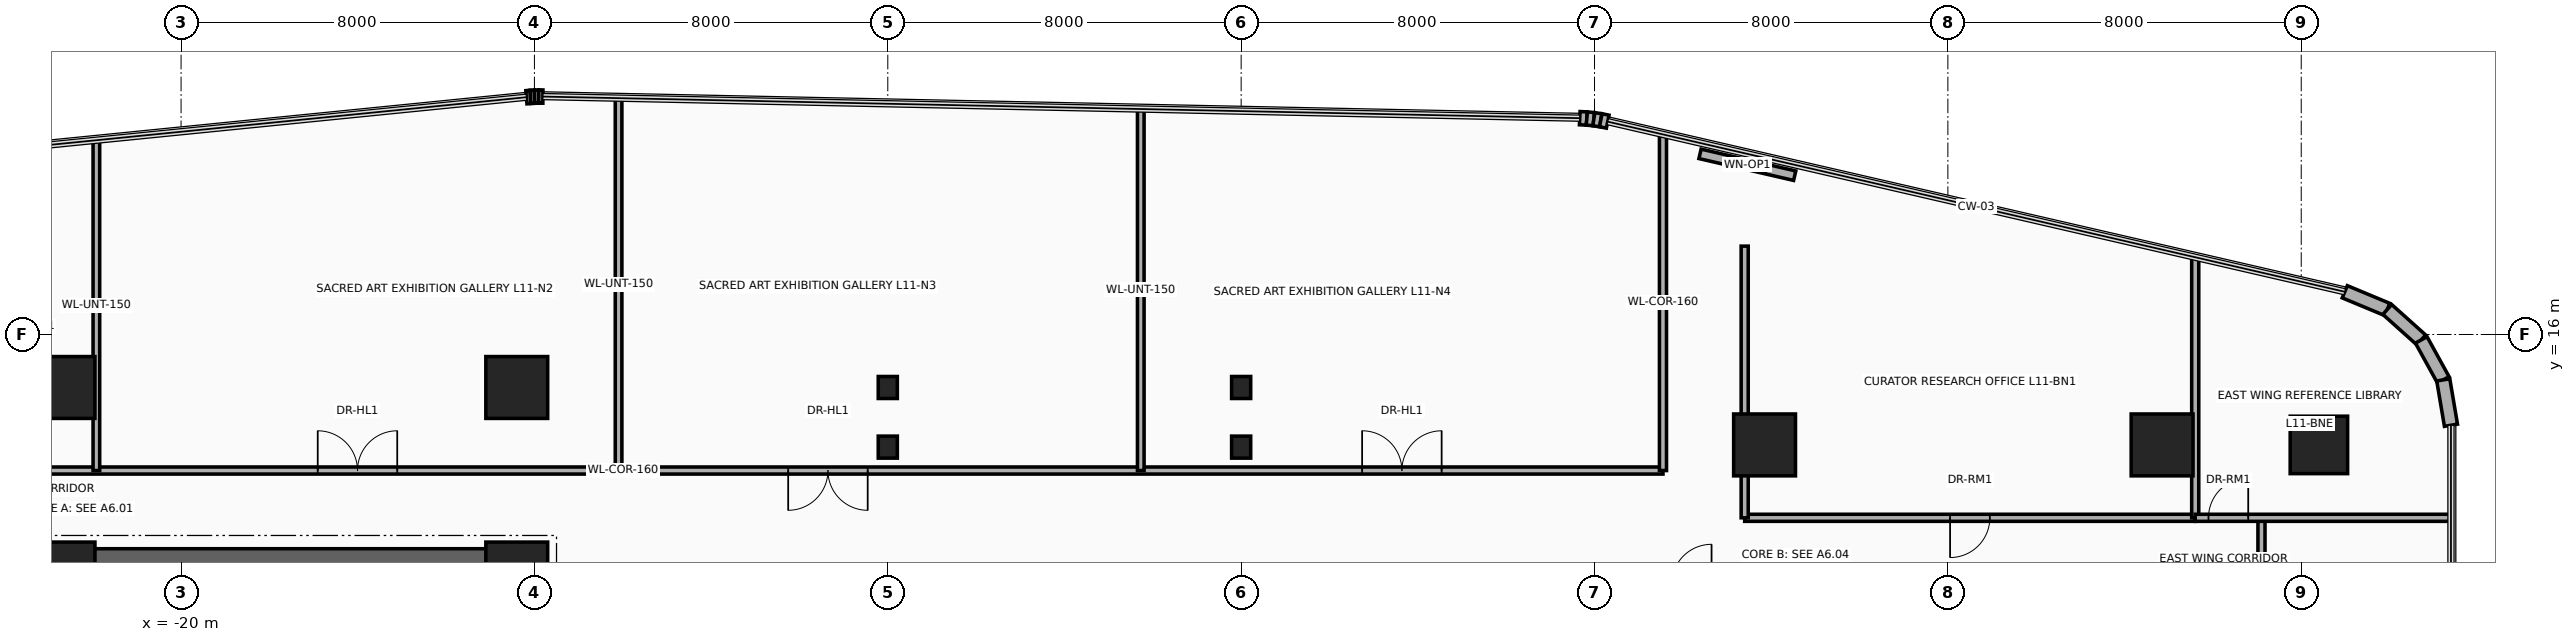
"""IFC4 building model, lengths in metres.
Left out: names, types, materials, properties, quantities, classifications, styles, units other than length and angle.
Written with IfcOpenShell. Run it as: python <this file> out.ifc"""

import sys

from ifc_helpers import new_model, si_unit, direction, frame, frame_2d, origin, origin_2d, place, context, subcontext, project, spatial, rectangle, circle, i_section, extrude, source, transform, mapped, element, fill, save


model = new_model("IFC4")
c1 = context("Model", 3, precision=1e-05, world=origin(), true_north=direction((0.0, 1.0)))
c2 = subcontext(c1, "Body", "Model", "MODEL_VIEW")
j1 = project(units=[si_unit("LENGTHUNIT", "METRE"), si_unit("PLANEANGLEUNIT", "RADIAN")], contexts=[c1])
p1 = place(None, origin())
s1 = spatial("IfcSite", under=j1, at=p1, CompositionType="ELEMENT")
p2 = place(p1, origin())
s2 = spatial("IfcBuilding", under=s1, at=p2, CompositionType="ELEMENT")
p3 = place(p2, frame((0.0, 0.0, 48.2)))
s3 = spatial("IfcBuildingStorey", under=s2, at=p3, CompositionType="ELEMENT", Elevation=48.2)
p4 = place(p3, frame((-22.65, -11.15, 0.0), z_axis=(0.0, 0.0, 1.0), x_axis=(0.0, 1.0, 0.0)))
e1 = element("IfcWall", 1, at=p4, inside=s3, PredefinedType="SHEAR", context=c2, shape_type="SweptSolid", body=[
    extrude(rectangle(XDim=22.3, YDim=0.7, at=frame_2d((11.15, 0.0))), origin(), (0.0, 0.0, 1.0), 3.46),
])
p5 = place(p3, frame((-22.65, 10.8, 0.0), z_axis=(0.0, 0.0, 1.0), x_axis=(1.0, 0.0, 0.0)))
e2 = element("IfcWall", 2, at=p5, inside=s3, PredefinedType="SHEAR", context=c2, shape_type="SweptSolid", body=[
    extrude(rectangle(XDim=10.25, YDim=0.7, at=frame_2d((5.125, 0.0))), origin(), (0.0, 0.0, 1.0), 3.46),
])
m1 = source(origin(), c2, "Body", "SweptSolid", [
    extrude(rectangle(XDim=1.4, YDim=1.4, at=origin_2d()), origin(), (0.0, 0.0, 1.0), 3.7),
])
for number, where, z_axis, x_axis in (
    (3, (-22.65, 10.6, 0.0), (0.0, 0.0, 1.0), (1.0, 0.0, 0.0)),
    (4, (-12.4, 10.6, 0.0), (0.0, 0.0, 1.0), (1.0, 0.0, 0.0)),
    (5, (-22.65, 14.8, 0.0), (0.0, 0.0, 1.0), (1.0, 0.0, 0.0)),
    (6, (-12.4, 14.8, 0.0), (0.0, 0.0, 1.0), (1.0, 0.0, 0.0)),
    (7, (15.85, 13.5, 0.0), (0.0, 0.0, 1.0), (1.0, 0.0, 0.0)),
    (8, (24.85, 13.5, 0.0), (0.0, 0.0, 1.0), (1.0, 0.0, 0.0)),
):
    element("IfcColumn", number, at=place(p3, frame(where, z_axis=z_axis, x_axis=x_axis)), inside=s3, PredefinedType="COLUMN", context=c2, shape_type="MappedRepresentation", body=[
        mapped(m1, transform((0.0, 0.0, 0.0), x_axis=(1.0, 0.0, 0.0), y_axis=(0.0, 1.0, 0.0), z_axis=(0.0, 0.0, 1.0), scale=1.0)),
    ])
m2 = source(origin(), c2, "Body", "SweptSolid", [
    extrude(circle(Radius=0.65, at=origin_2d()), origin(), (0.0, 0.0, 1.0), 3.7),
])
p6 = place(p3, frame((28.4, 13.5, 0.0), z_axis=(0.0, 0.0, 1.0), x_axis=(1.0, 0.0, 0.0)))
e9 = element("IfcColumn", 9, at=p6, inside=s3, PredefinedType="COLUMN", context=c2, shape_type="MappedRepresentation", body=[
    mapped(m2, transform((0.0, 0.0, 0.0), x_axis=(1.0, 0.0, 0.0), y_axis=(0.0, 1.0, 0.0), z_axis=(0.0, 0.0, 1.0), scale=1.0)),
])
m3 = source(origin(), c2, "Body", "SweptSolid", [
    extrude(i_section(OverallWidth=0.432, OverallDepth=0.498, WebThickness=0.056, FlangeThickness=0.089, at=origin_2d()), origin(), (0.0, 0.0, 1.0), 3.7),
])
for number, where, z_axis, x_axis in (
    (10, (-4.0, 13.45, 0.0), (0.0, 0.0, 1.0), (1.0, 0.0, 0.0)),
    (11, (-4.0, 14.8, 0.0), (0.0, 0.0, 1.0), (1.0, 0.0, 0.0)),
    (12, (4.0, 13.45, 0.0), (0.0, 0.0, 1.0), (1.0, 0.0, 0.0)),
    (13, (4.0, 14.8, 0.0), (0.0, 0.0, 1.0), (1.0, 0.0, 0.0)),
):
    element("IfcColumn", number, at=place(p3, frame(where, z_axis=z_axis, x_axis=x_axis)), inside=s3, PredefinedType="COLUMN", context=c2, shape_type="MappedRepresentation", body=[
        mapped(m3, transform((0.0, 0.0, 0.0), x_axis=(1.0, 0.0, 0.0), y_axis=(0.0, 1.0, 0.0), z_axis=(0.0, 0.0, 1.0), scale=1.0)),
    ])
p7 = place(p3, frame((-12.182, 21.371, 0.0), z_axis=(0.0, 0.0, 1.0), x_axis=(0.996527790842, 0.08326080759, 0.0)))
e14 = element("IfcWall", 14, at=p7, inside=s3, PredefinedType="SOLIDWALL", context=c2, shape_type="SweptSolid", body=[
    extrude(rectangle(XDim=0.094, YDim=0.3, at=frame_2d((0.047, 0.0))), origin(), (0.0, 0.0, 1.0), 3.46),
])
p8 = place(p3, frame((-12.088, 21.379, 0.0), z_axis=(0.0, 0.0, 1.0), x_axis=(0.998476480444, 0.055178963393, 0.0)))
e15 = element("IfcWall", 15, at=p8, inside=s3, PredefinedType="SOLIDWALL", context=c2, shape_type="SweptSolid", body=[
    extrude(rectangle(XDim=0.093, YDim=0.3, at=frame_2d((0.046, 0.0))), origin(), (0.0, 0.0, 1.0), 3.46),
])
p9 = place(p3, frame((-11.996, 21.384, 0.0), z_axis=(0.0, 0.0, 1.0), x_axis=(0.999722573757, 0.023553673204, 0.0)))
e16 = element("IfcWall", 16, at=p9, inside=s3, PredefinedType="SOLIDWALL", context=c2, shape_type="SweptSolid", body=[
    extrude(rectangle(XDim=0.093, YDim=0.3, at=frame_2d((0.047, 0.0))), origin(), (0.0, 0.0, 1.0), 3.46),
])
p10 = place(p3, frame((-11.902, 21.386, 0.0), z_axis=(0.0, 0.0, 1.0), x_axis=(0.999986507273, -0.005194735103, 0.0)))
e17 = element("IfcWall", 17, at=p10, inside=s3, PredefinedType="SOLIDWALL", context=c2, shape_type="SweptSolid", body=[
    extrude(rectangle(XDim=0.094, YDim=0.3, at=frame_2d((0.047, 0.0))), origin(), (0.0, 0.0, 1.0), 3.46),
])
p11 = place(p3, frame((11.666, 20.897, 0.0), z_axis=(0.0, 0.0, 1.0), x_axis=(0.998885297239, -0.047203421059, 0.0)))
e18 = element("IfcWall", 18, at=p11, inside=s3, PredefinedType="SOLIDWALL", context=c2, shape_type="SweptSolid", body=[
    extrude(rectangle(XDim=0.16, YDim=0.3, at=frame_2d((0.08, 0.0))), origin(), (0.0, 0.0, 1.0), 3.46),
])
p12 = place(p3, frame((11.826, 20.889, 0.0), z_axis=(0.0, 0.0, 1.0), x_axis=(0.995172891136, -0.098137234257, 0.0)))
e19 = element("IfcWall", 19, at=p12, inside=s3, PredefinedType="SOLIDWALL", context=c2, shape_type="SweptSolid", body=[
    extrude(rectangle(XDim=0.159, YDim=0.3, at=frame_2d((0.08, 0.0))), origin(), (0.0, 0.0, 1.0), 3.46),
])
p13 = place(p3, frame((11.984, 20.874, 0.0), z_axis=(0.0, 0.0, 1.0), x_axis=(0.988846069207, -0.148941100486, 0.0)))
e20 = element("IfcWall", 20, at=p13, inside=s3, PredefinedType="SOLIDWALL", context=c2, shape_type="SweptSolid", body=[
    extrude(rectangle(XDim=0.159, YDim=0.3, at=frame_2d((0.08, 0.0))), origin(), (0.0, 0.0, 1.0), 3.46),
])
p14 = place(p3, frame((12.142, 20.85, 0.0), z_axis=(0.0, 0.0, 1.0), x_axis=(0.979991950448, -0.19903712482, 0.0)))
e21 = element("IfcWall", 21, at=p14, inside=s3, PredefinedType="SOLIDWALL", context=c2, shape_type="SweptSolid", body=[
    extrude(rectangle(XDim=0.161, YDim=0.3, at=frame_2d((0.08, 0.0))), origin(), (0.0, 0.0, 1.0), 3.46),
])
p15 = place(p3, frame((14.389, 20.09, 0.0), z_axis=(0.0, 0.0, 1.0), x_axis=(0.974400545997, -0.224818984875, 0.0)))
e22 = element("IfcWall", 22, at=p15, inside=s3, PredefinedType="SOLIDWALL", context=c2, shape_type="SweptSolid", body=[
    extrude(rectangle(XDim=2.2, YDim=0.22, at=frame_2d((1.1, 0.0))), origin(), (0.0, 0.0, 1.0), 3.46),
])
p16 = place(p15, frame((0.65, 0.0, 0.95)))
e23 = element("IfcOpeningElement", 23, at=p16, cuts=e22, PredefinedType="OPENING", context=c2, shape_type="SweptSolid", body=[
    extrude(rectangle(XDim=0.9, YDim=1.3, at=frame_2d((0.45, 0.65))), frame((0.0, 0.125, 0.0), z_axis=(0.0, -1.0, 0.0), x_axis=(1.0, 0.0, 0.0)), (0.0, 0.0, 1.0), 0.25),
])
p17 = place(p3, frame((28.986, 16.967, 0.0), z_axis=(0.0, 0.0, 1.0), x_axis=(0.923083852684, -0.384598753136, 0.0)))
e24 = element("IfcWall", 24, at=p17, inside=s3, PredefinedType="SOLIDWALL", context=c2, shape_type="SweptSolid", body=[
    extrude(rectangle(XDim=1.042, YDim=0.3, at=frame_2d((0.521, 0.0))), origin(), (0.0, 0.0, 1.0), 3.46),
])
p18 = place(p3, frame((29.948, 16.566, 0.0), z_axis=(0.0, 0.0, 1.0), x_axis=(0.744585645533, -0.66752694063, 0.0)))
e25 = element("IfcWall", 25, at=p18, inside=s3, PredefinedType="SOLIDWALL", context=c2, shape_type="SweptSolid", body=[
    extrude(rectangle(XDim=1.033, YDim=0.3, at=frame_2d((0.517, 0.0))), origin(), (0.0, 0.0, 1.0), 3.46),
])
p19 = place(p3, frame((30.717, 15.877, 0.0), z_axis=(0.0, 0.0, 1.0), x_axis=(0.482971098131, -0.875636293429, 0.0)))
e26 = element("IfcWall", 26, at=p19, inside=s3, PredefinedType="SOLIDWALL", context=c2, shape_type="SweptSolid", body=[
    extrude(rectangle(XDim=1.033, YDim=0.3, at=frame_2d((0.516, 0.0))), origin(), (0.0, 0.0, 1.0), 3.46),
])
p20 = place(p3, frame((31.216, 14.973, 0.0), z_axis=(0.0, 0.0, 1.0), x_axis=(0.167019462117, -0.985953598946, 0.0)))
e27 = element("IfcWall", 27, at=p20, inside=s3, PredefinedType="SOLIDWALL", context=c2, shape_type="SweptSolid", body=[
    extrude(rectangle(XDim=1.042, YDim=0.3, at=frame_2d((0.521, 0.0))), origin(), (0.0, 0.0, 1.0), 3.46),
])
p21 = place(p3, frame((-33.54, 12.92, 0.0), z_axis=(0.0, 0.0, 1.0), x_axis=(1.0, 0.0, 0.0)))
e28 = element("IfcWall", 28, at=p21, inside=s3, PredefinedType="PARTITIONING", context=c2, shape_type="SweptSolid", body=[
    extrude(rectangle(XDim=47.09, YDim=0.16, at=frame_2d((23.545, 0.0))), origin(), (0.0, 0.0, 1.0), 2.583),
])
p22 = place(p21, frame((4.911, 0.0, 0.0)))
e29 = element("IfcOpeningElement", 29, at=p22, cuts=e28, PredefinedType="OPENING", context=c2, shape_type="SweptSolid", body=[
    extrude(rectangle(XDim=1.8, YDim=2.15, at=frame_2d((0.9, 1.075))), frame((0.0, 0.095, 0.0), z_axis=(0.0, -1.0, 0.0), x_axis=(1.0, 0.0, 0.0)), (0.0, 0.0, 1.0), 0.19),
])
p23 = place(p21, frame((16.634, 0.0, 0.0)))
e30 = element("IfcOpeningElement", 30, at=p23, cuts=e28, PredefinedType="OPENING", context=c2, shape_type="SweptSolid", body=[
    extrude(rectangle(XDim=1.8, YDim=2.15, at=frame_2d((0.9, 1.075))), frame((0.0, 0.095, 0.0), z_axis=(0.0, -1.0, 0.0), x_axis=(1.0, 0.0, 0.0)), (0.0, 0.0, 1.0), 0.19),
])
p24 = place(p21, frame((27.285, 0.0, 0.0)))
e31 = element("IfcOpeningElement", 31, at=p24, cuts=e28, PredefinedType="OPENING", context=c2, shape_type="SweptSolid", body=[
    extrude(rectangle(XDim=1.8, YDim=2.15, at=frame_2d((0.9, 1.075))), frame((0.0, 0.095, 0.0), z_axis=(0.0, -1.0, 0.0), x_axis=(1.0, 0.0, 0.0)), (0.0, 0.0, 1.0), 0.19),
])
p25 = place(p21, frame((40.279, 0.0, 0.0)))
e32 = element("IfcOpeningElement", 32, at=p25, cuts=e28, PredefinedType="OPENING", context=c2, shape_type="SweptSolid", body=[
    extrude(rectangle(XDim=1.8, YDim=2.15, at=frame_2d((0.9, 1.075))), frame((0.0, 0.095, 0.0), z_axis=(0.0, -1.0, 0.0), x_axis=(1.0, 0.0, 0.0)), (0.0, 0.0, 1.0), 0.19),
])
p26 = place(p3, frame((13.55, 12.92, 0.0), z_axis=(0.0, 0.0, 1.0), x_axis=(0.0, 1.0, 0.0)))
e33 = element("IfcWall", 33, at=p26, inside=s3, PredefinedType="PARTITIONING", context=c2, shape_type="SweptSolid", body=[
    extrude(rectangle(XDim=7.609, YDim=0.16, at=frame_2d((3.805, 0.0))), origin(), (0.0, 0.0, 1.0), 2.583),
])
p27 = place(p3, frame((-21.917, 12.92, 0.0), z_axis=(0.0, 0.0, 1.0), x_axis=(0.0, 1.0, 0.0)))
e34 = element("IfcWall", 34, at=p27, inside=s3, PredefinedType="PARTITIONING", context=c2, shape_type="SweptSolid", body=[
    extrude(rectangle(XDim=7.478, YDim=0.15, at=frame_2d((3.739, 0.0))), origin(), (0.0, 0.0, 1.0), 2.583),
])
p28 = place(p3, frame((-10.095, 12.92, 0.0), z_axis=(0.0, 0.0, 1.0), x_axis=(0.0, 1.0, 0.0)))
e35 = element("IfcWall", 35, at=p28, inside=s3, PredefinedType="PARTITIONING", context=c2, shape_type="SweptSolid", body=[
    extrude(rectangle(XDim=8.43, YDim=0.15, at=frame_2d((4.215, 0.0))), origin(), (0.0, 0.0, 1.0), 2.583),
])
p29 = place(p3, frame((1.728, 12.92, 0.0), z_axis=(0.0, 0.0, 1.0), x_axis=(0.0, 1.0, 0.0)))
e36 = element("IfcWall", 36, at=p29, inside=s3, PredefinedType="PARTITIONING", context=c2, shape_type="SweptSolid", body=[
    extrude(rectangle(XDim=8.184, YDim=0.15, at=frame_2d((4.092, 0.0))), origin(), (0.0, 0.0, 1.0), 2.583),
])
p30 = place(p3, frame((15.4, 11.85, 0.0), z_axis=(0.0, 0.0, 1.0), x_axis=(1.0, 0.0, 0.0)))
e37 = element("IfcWall", 37, at=p30, inside=s3, PredefinedType="PARTITIONING", context=c2, shape_type="SweptSolid", body=[
    extrude(rectangle(XDim=10.2, YDim=0.16, at=frame_2d((5.1, 0.0))), origin(), (0.0, 0.0, 1.0), 2.834),
])
p31 = place(p30, frame((4.65, 0.0, 0.0)))
e38 = element("IfcOpeningElement", 38, at=p31, cuts=e37, PredefinedType="OPENING", context=c2, shape_type="SweptSolid", body=[
    extrude(rectangle(XDim=0.9, YDim=2.1, at=frame_2d((0.45, 1.05))), frame((0.0, 0.095, 0.0), z_axis=(0.0, -1.0, 0.0), x_axis=(1.0, 0.0, 0.0)), (0.0, 0.0, 1.0), 0.19),
])
p32 = place(p3, frame((15.4, 11.85, 0.0), z_axis=(0.0, 0.0, 1.0), x_axis=(0.0, 1.0, 0.0)))
e39 = element("IfcWall", 39, at=p32, inside=s3, PredefinedType="PARTITIONING", context=c2, shape_type="SweptSolid", body=[
    extrude(rectangle(XDim=6.15, YDim=0.16, at=frame_2d((3.075, 0.0))), origin(), (0.0, 0.0, 1.0), 2.583),
])
p33 = place(p3, frame((25.6, 11.85, 0.0), z_axis=(0.0, 0.0, 1.0), x_axis=(0.0, 1.0, 0.0)))
e40 = element("IfcWall", 40, at=p33, inside=s3, PredefinedType="PARTITIONING", context=c2, shape_type="SweptSolid", body=[
    extrude(rectangle(XDim=5.898, YDim=0.16, at=frame_2d((2.949, 0.0))), origin(), (0.0, 0.0, 1.0), 2.583),
])
p34 = place(p3, frame((27.1, -13.89, 0.0), z_axis=(0.0, 0.0, 1.0), x_axis=(0.0, 1.0, 0.0)))
e41 = element("IfcWall", 41, at=p34, inside=s3, PredefinedType="PARTITIONING", context=c2, shape_type="SweptSolid", body=[
    extrude(rectangle(XDim=25.74, YDim=0.16, at=frame_2d((12.87, 0.0))), origin(), (0.0, 0.0, 1.0), 2.583),
])
p35 = place(p34, frame((5.258, 0.0, 0.0)))
e42 = element("IfcOpeningElement", 42, at=p35, cuts=e41, PredefinedType="OPENING", context=c2, shape_type="SweptSolid", body=[
    extrude(rectangle(XDim=1.8, YDim=2.15, at=frame_2d((0.9, 1.075))), frame((0.0, 0.095, 0.0), z_axis=(0.0, -1.0, 0.0), x_axis=(1.0, 0.0, 0.0)), (0.0, 0.0, 1.0), 0.19),
])
p36 = place(p34, frame((18.128, 0.0, 0.0)))
e43 = element("IfcOpeningElement", 43, at=p36, cuts=e41, PredefinedType="OPENING", context=c2, shape_type="SweptSolid", body=[
    extrude(rectangle(XDim=1.8, YDim=2.15, at=frame_2d((0.9, 1.075))), frame((0.0, 0.095, 0.0), z_axis=(0.0, -1.0, 0.0), x_axis=(1.0, 0.0, 0.0)), (0.0, 0.0, 1.0), 0.19),
])
p37 = place(p3, frame((25.6, 11.85, 0.0), z_axis=(0.0, 0.0, 1.0), x_axis=(1.0, 0.0, 0.0)))
e44 = element("IfcWall", 44, at=p37, inside=s3, PredefinedType="PARTITIONING", context=c2, shape_type="SweptSolid", body=[
    extrude(rectangle(XDim=5.79, YDim=0.16, at=frame_2d((2.895, 0.0))), origin(), (0.0, 0.0, 1.0), 2.896),
])
p38 = place(p37, frame((0.3, 0.0, 0.0)))
e45 = element("IfcOpeningElement", 45, at=p38, cuts=e44, PredefinedType="OPENING", context=c2, shape_type="SweptSolid", body=[
    extrude(rectangle(XDim=0.9, YDim=2.1, at=frame_2d((0.45, 1.05))), frame((0.0, 0.095, 0.0), z_axis=(0.0, -1.0, 0.0), x_axis=(1.0, 0.0, 0.0)), (0.0, 0.0, 1.0), 0.19),
])
p39 = place(p16, origin())
e46 = element("IfcWindow", 46, at=p39, inside=s3, PartitioningType="SINGLE_PANEL", PredefinedType="WINDOW", context=c2, shape_type="SweptSolid", body=[
    extrude(rectangle(XDim=0.9, YDim=1.3, at=frame_2d((0.45, 0.65))), frame((0.0, 0.03, 0.0), z_axis=(0.0, -1.0, 0.0), x_axis=(1.0, 0.0, 0.0)), (0.0, 0.0, 1.0), 0.06),
])
fill(e23, e46)
p40 = place(p23, origin())
e47 = element("IfcDoor", 47, at=p40, inside=s3, OperationType="DOUBLE_DOOR_SINGLE_SWING", PredefinedType="DOOR", context=c2, shape_type="SweptSolid", body=[
    extrude(rectangle(XDim=1.8, YDim=2.15, at=frame_2d((0.9, 1.075))), frame((0.0, 0.025, 0.0), z_axis=(0.0, -1.0, 0.0), x_axis=(1.0, 0.0, 0.0)), (0.0, 0.0, 1.0), 0.05),
])
fill(e30, e47)
p41 = place(p24, frame((1.8, 0.0, 0.0), z_axis=(0.0, 0.0, 1.0), x_axis=(-1.0, 0.0, 0.0)))
e48 = element("IfcDoor", 48, at=p41, inside=s3, OperationType="DOUBLE_DOOR_SINGLE_SWING", PredefinedType="DOOR", context=c2, shape_type="SweptSolid", body=[
    extrude(rectangle(XDim=1.8, YDim=2.15, at=frame_2d((0.9, 1.075))), frame((0.0, 0.025, 0.0), z_axis=(0.0, -1.0, 0.0), x_axis=(1.0, 0.0, 0.0)), (0.0, 0.0, 1.0), 0.05),
])
fill(e31, e48)
p42 = place(p25, origin())
e49 = element("IfcDoor", 49, at=p42, inside=s3, OperationType="DOUBLE_DOOR_SINGLE_SWING", PredefinedType="DOOR", context=c2, shape_type="SweptSolid", body=[
    extrude(rectangle(XDim=1.8, YDim=2.15, at=frame_2d((0.9, 1.075))), frame((0.0, 0.025, 0.0), z_axis=(0.0, -1.0, 0.0), x_axis=(1.0, 0.0, 0.0)), (0.0, 0.0, 1.0), 0.05),
])
fill(e32, e49)
p43 = place(p31, frame((0.9, 0.0, 0.0), z_axis=(0.0, 0.0, 1.0), x_axis=(-1.0, 0.0, 0.0)))
e50 = element("IfcDoor", 50, at=p43, inside=s3, OperationType="SINGLE_SWING_LEFT", PredefinedType="DOOR", context=c2, shape_type="SweptSolid", body=[
    extrude(rectangle(XDim=0.9, YDim=2.1, at=frame_2d((0.45, 1.05))), frame((0.0, 0.025, 0.0), z_axis=(0.0, -1.0, 0.0), x_axis=(1.0, 0.0, 0.0)), (0.0, 0.0, 1.0), 0.05),
])
fill(e38, e50)
p44 = place(p38, origin())
e51 = element("IfcDoor", 51, at=p44, inside=s3, OperationType="SINGLE_SWING_LEFT", PredefinedType="DOOR", context=c2, shape_type="SweptSolid", body=[
    extrude(rectangle(XDim=0.9, YDim=2.1, at=frame_2d((0.45, 1.05))), frame((0.0, 0.025, 0.0), z_axis=(0.0, -1.0, 0.0), x_axis=(1.0, 0.0, 0.0)), (0.0, 0.0, 1.0), 0.05),
])
fill(e45, e51)
save(model, sys.argv[1])
